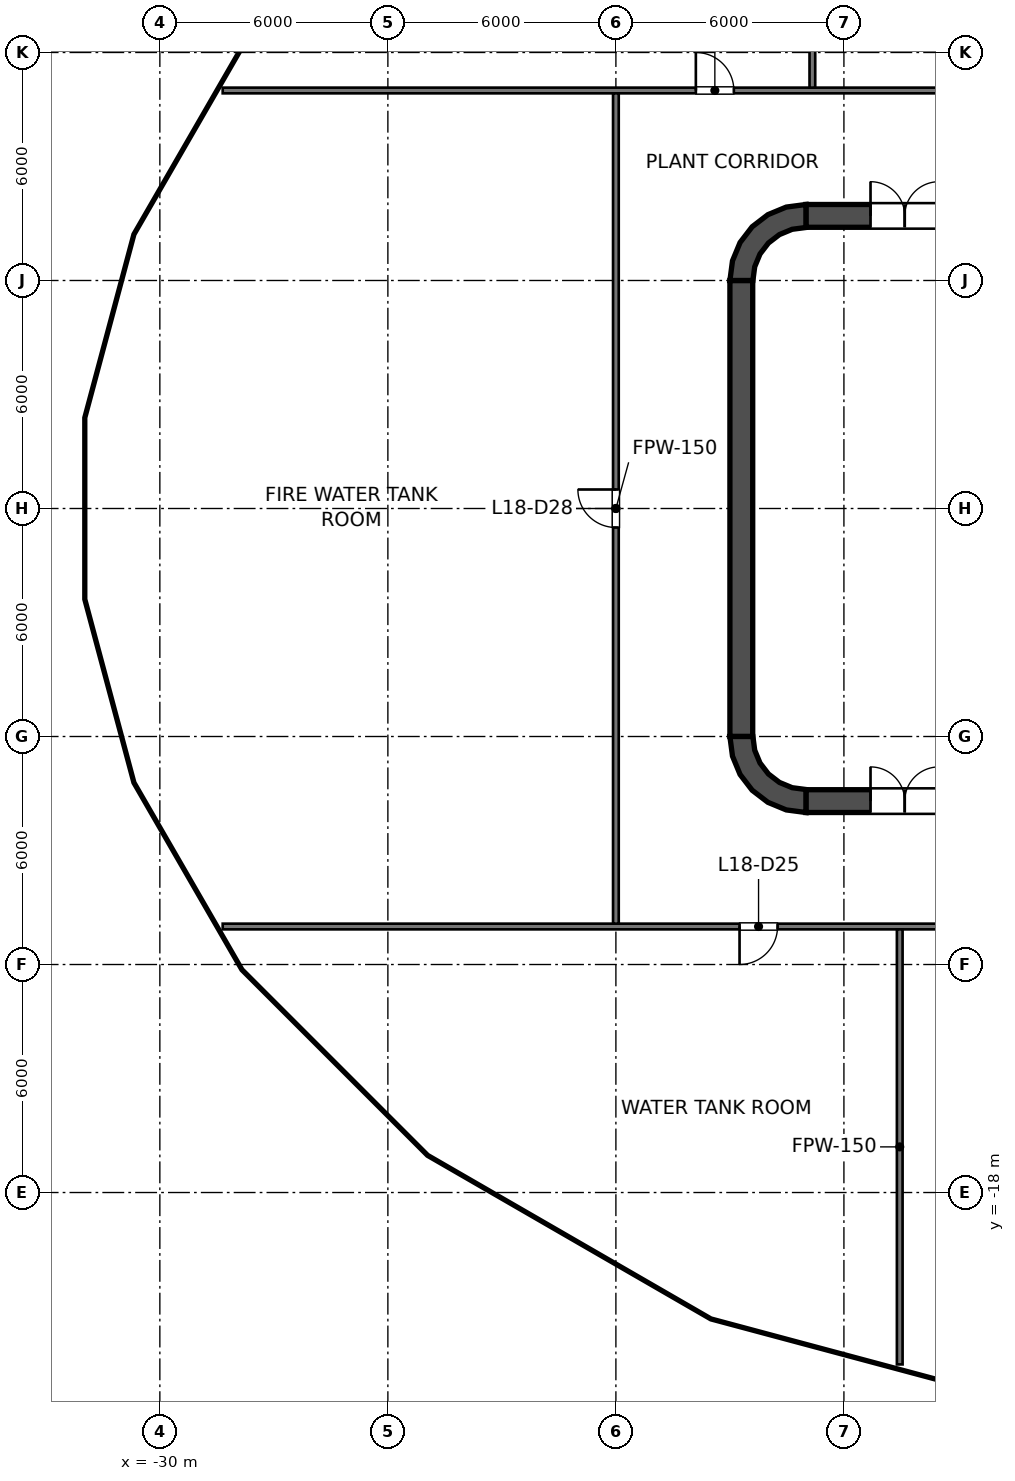
"""IFC4 building model, lengths in metres.
Left out: names, types, materials, properties, quantities, classifications, styles, units other than length and angle.
Written with IfcOpenShell. Run it as: python <this file> out.ifc"""

import sys

from ifc_helpers import new_model, si_unit, direction, frame, frame_2d, origin, place, context, subcontext, project, spatial, polyline, rectangle, outline, extrude, element, fill, save


model = new_model("IFC4")
c1 = context("Model", 3, precision=1e-05, world=origin(), true_north=direction((0.0, 1.0)))
c2 = subcontext(c1, "Body", "Model", "MODEL_VIEW")
j1 = project(units=[si_unit("LENGTHUNIT", "METRE"), si_unit("PLANEANGLEUNIT", "RADIAN")], contexts=[c1])
p1 = place(None, origin())
s1 = spatial("IfcSite", under=j1, at=p1, CompositionType="ELEMENT")
p2 = place(p1, origin())
s2 = spatial("IfcBuilding", under=s1, at=p2, CompositionType="ELEMENT")
p3 = place(p2, frame((0.0, 0.0, 96.6)))
s3 = spatial("IfcBuildingStorey", under=s2, at=p3, CompositionType="ELEMENT", Elevation=96.6)
p4 = place(p3, frame((-13.0, 7.7, 0.0), z_axis=(0.0, 0.0, 1.0), x_axis=(1.0, 0.0, 0.0)))
e1 = element("IfcWall", 1, at=p4, inside=s3, PredefinedType="SHEAR", context=c2, shape_type="SweptSolid", body=[
    extrude(rectangle(XDim=26.0, YDim=0.6, at=frame_2d((13.0, 0.0))), origin(), (0.0, 0.0, 1.0), 5.4),
])
p5 = place(p4, frame((1.7, 0.0, 0.0)))
e2 = element("IfcOpeningElement", 2, at=p5, cuts=e1, PredefinedType="OPENING", context=c2, shape_type="SweptSolid", body=[
    extrude(rectangle(XDim=1.8, YDim=2.1, at=frame_2d((0.9, 1.05))), frame((0.0, 0.3, 0.0), z_axis=(0.0, -1.0, 0.0), x_axis=(1.0, 0.0, 0.0)), (0.0, 0.0, 1.0), 0.6),
])
p6 = place(p4, frame((22.5, 0.0, 0.0)))
e3 = element("IfcOpeningElement", 3, at=p6, cuts=e1, PredefinedType="OPENING", context=c2, shape_type="SweptSolid", body=[
    extrude(rectangle(XDim=1.8, YDim=2.1, at=frame_2d((0.9, 1.05))), frame((0.0, 0.3, 0.0), z_axis=(0.0, -1.0, 0.0), x_axis=(1.0, 0.0, 0.0)), (0.0, 0.0, 1.0), 0.6),
])
p7 = place(p3, frame((-13.0, -7.7, 0.0), z_axis=(0.0, 0.0, 1.0), x_axis=(1.0, 0.0, 0.0)))
e4 = element("IfcWall", 4, at=p7, inside=s3, PredefinedType="SHEAR", context=c2, shape_type="SweptSolid", body=[
    extrude(rectangle(XDim=26.0, YDim=0.6, at=frame_2d((13.0, 0.0))), origin(), (0.0, 0.0, 1.0), 5.4),
])
p8 = place(p7, frame((1.7, 0.0, 0.0)))
e5 = element("IfcOpeningElement", 5, at=p8, cuts=e4, PredefinedType="OPENING", context=c2, shape_type="SweptSolid", body=[
    extrude(rectangle(XDim=1.8, YDim=2.1, at=frame_2d((0.9, 1.05))), frame((0.0, 0.3, 0.0), z_axis=(0.0, -1.0, 0.0), x_axis=(1.0, 0.0, 0.0)), (0.0, 0.0, 1.0), 0.6),
])
p9 = place(p7, frame((22.5, 0.0, 0.0)))
e6 = element("IfcOpeningElement", 6, at=p9, cuts=e4, PredefinedType="OPENING", context=c2, shape_type="SweptSolid", body=[
    extrude(rectangle(XDim=1.8, YDim=2.1, at=frame_2d((0.9, 1.05))), frame((0.0, 0.3, 0.0), z_axis=(0.0, -1.0, 0.0), x_axis=(1.0, 0.0, 0.0)), (0.0, 0.0, 1.0), 0.6),
])
p10 = place(p3, frame((-14.7, -6.0, 0.0), z_axis=(0.0, 0.0, 1.0), x_axis=(0.0, 1.0, 0.0)))
e7 = element("IfcWall", 7, at=p10, inside=s3, PredefinedType="SHEAR", context=c2, shape_type="SweptSolid", body=[
    extrude(rectangle(XDim=12.0, YDim=0.6, at=frame_2d((6.0, 0.0))), origin(), (0.0, 0.0, 1.0), 5.4),
])
p11 = place(p3, origin())
e8 = element("IfcWall", 8, at=p11, inside=s3, PredefinedType="SHEAR", context=c2, shape_type="SweptSolid", body=[
    extrude(outline(polyline([(-15.0, 6.0), (-14.395, 6.0), (-14.347, 6.361), (-14.208, 6.698), (-13.986, 6.986), (-13.698, 7.208), (-13.361, 7.347), (-13.0, 7.395), (-13.0, 8.0), (-13.518, 7.932), (-14.0, 7.732), (-14.414, 7.414), (-14.732, 7.0), (-14.932, 6.518), (-15.0, 6.0)])), origin(), (0.0, 0.0, 1.0), 5.4),
])
e9 = element("IfcWall", 9, at=p11, inside=s3, PredefinedType="SHEAR", context=c2, shape_type="SweptSolid", body=[
    extrude(outline(polyline([(-13.0, -8.0), (-13.0, -7.395), (-13.361, -7.347), (-13.698, -7.208), (-13.986, -6.986), (-14.208, -6.698), (-14.347, -6.361), (-14.395, -6.0), (-15.0, -6.0), (-14.932, -6.518), (-14.732, -7.0), (-14.414, -7.414), (-14.0, -7.732), (-13.518, -7.932), (-13.0, -8.0)])), origin(), (0.0, 0.0, 1.0), 5.4),
])
p12 = place(p3, frame((-11.8, -7.4, 0.0), z_axis=(0.0, 0.0, 1.0), x_axis=(0.0, 1.0, 0.0)))
e10 = element("IfcWall", 10, at=p12, inside=s3, PredefinedType="SOLIDWALL", context=c2, shape_type="SweptSolid", body=[
    extrude(rectangle(XDim=14.8, YDim=0.4, at=frame_2d((7.4, 0.0))), origin(), (0.0, 0.0, 1.0), 5.25),
])
p13 = place(p12, frame((13.552, 0.0, 0.0)))
e11 = element("IfcOpeningElement", 11, at=p13, cuts=e10, PredefinedType="OPENING", context=c2, shape_type="SweptSolid", body=[
    extrude(rectangle(XDim=0.9, YDim=2.1, at=frame_2d((0.45, 1.05))), frame((0.0, 0.2, 0.0), z_axis=(0.0, -1.0, 0.0), x_axis=(1.0, 0.0, 0.0)), (0.0, 0.0, 1.0), 0.4),
])
p14 = place(p12, frame((0.347, 0.0, 0.0)))
e12 = element("IfcOpeningElement", 12, at=p14, cuts=e10, PredefinedType="OPENING", context=c2, shape_type="SweptSolid", body=[
    extrude(rectangle(XDim=0.9, YDim=2.1, at=frame_2d((0.45, 1.05))), frame((0.0, 0.2, 0.0), z_axis=(0.0, -1.0, 0.0), x_axis=(1.0, 0.0, 0.0)), (0.0, 0.0, 1.0), 0.4),
])
e13 = element("IfcWall", 13, at=p11, inside=s3, PredefinedType="SOLIDWALL", context=c2, shape_type="SweptSolid", body=[
    extrude(outline(polyline([(-12.0, -5.925), (-12.0, -5.675), (-14.15, -5.675), (-14.15, -3.025), (-12.0, -3.025), (-12.0, -2.775), (-14.15, -2.775), (-14.15, -0.125), (-12.0, -0.125), (-12.0, 0.125), (-14.15, 0.125), (-14.15, 2.775), (-12.0, 2.775), (-12.0, 3.025), (-14.15, 3.025), (-14.15, 5.675), (-12.0, 5.675), (-12.0, 5.925), (-14.15, 5.925), (-14.4, 5.925), (-14.4, 5.675), (-14.4, 3.025), (-14.4, 2.775), (-14.4, 0.125), (-14.4, -0.125), (-14.4, -2.775), (-14.4, -3.025), (-14.4, -5.675), (-14.4, -5.925), (-14.15, -5.925), (-12.0, -5.925)])), origin(), (0.0, 0.0, 1.0), 5.25),
])
p15 = place(p3, frame((-28.346, 11.0, 0.0), z_axis=(0.0, 0.0, 1.0), x_axis=(1.0, 0.0, 0.0)))
e14 = element("IfcWall", 14, at=p15, inside=s3, PredefinedType="PARTITIONING", context=c2, shape_type="SweptSolid", body=[
    extrude(rectangle(XDim=56.692, YDim=0.15, at=frame_2d((28.346, 0.0))), origin(), (0.0, 0.0, 1.0), 4.327),
])
p16 = place(p15, frame((12.45, 0.0, 0.0)))
e15 = element("IfcOpeningElement", 15, at=p16, cuts=e14, PredefinedType="OPENING", context=c2, shape_type="SweptSolid", body=[
    extrude(rectangle(XDim=1.0, YDim=2.1, at=frame_2d((0.5, 1.05))), frame((0.0, 0.075, 0.0), z_axis=(0.0, -1.0, 0.0), x_axis=(1.0, 0.0, 0.0)), (0.0, 0.0, 1.0), 0.15),
])
p17 = place(p15, frame((19.45, 0.0, 0.0)))
e16 = element("IfcOpeningElement", 16, at=p17, cuts=e14, PredefinedType="OPENING", context=c2, shape_type="SweptSolid", body=[
    extrude(rectangle(XDim=1.0, YDim=2.1, at=frame_2d((0.5, 1.05))), frame((0.0, 0.075, 0.0), z_axis=(0.0, -1.0, 0.0), x_axis=(1.0, 0.0, 0.0)), (0.0, 0.0, 1.0), 0.15),
])
p18 = place(p15, frame((34.65, 0.0, 0.0)))
e17 = element("IfcOpeningElement", 17, at=p18, cuts=e14, PredefinedType="OPENING", context=c2, shape_type="SweptSolid", body=[
    extrude(rectangle(XDim=1.0, YDim=2.1, at=frame_2d((0.5, 1.05))), frame((0.0, 0.075, 0.0), z_axis=(0.0, -1.0, 0.0), x_axis=(1.0, 0.0, 0.0)), (0.0, 0.0, 1.0), 0.15),
])
p19 = place(p15, frame((42.6, 0.0, 0.0)))
e18 = element("IfcOpeningElement", 18, at=p19, cuts=e14, PredefinedType="OPENING", context=c2, shape_type="SweptSolid", body=[
    extrude(rectangle(XDim=1.0, YDim=2.1, at=frame_2d((0.5, 1.05))), frame((0.0, 0.075, 0.0), z_axis=(0.0, -1.0, 0.0), x_axis=(1.0, 0.0, 0.0)), (0.0, 0.0, 1.0), 0.15),
])
p20 = place(p15, frame((26.45, 0.0, 0.0)))
e19 = element("IfcOpeningElement", 19, at=p20, cuts=e14, PredefinedType="OPENING", context=c2, shape_type="SweptSolid", body=[
    extrude(rectangle(XDim=1.8, YDim=2.1, at=frame_2d((0.9, 1.05))), frame((0.0, 0.075, 0.0), z_axis=(0.0, -1.0, 0.0), x_axis=(1.0, 0.0, 0.0)), (0.0, 0.0, 1.0), 0.15),
])
p21 = place(p3, frame((-28.346, -11.0, 0.0), z_axis=(0.0, 0.0, 1.0), x_axis=(1.0, 0.0, 0.0)))
e20 = element("IfcWall", 20, at=p21, inside=s3, PredefinedType="PARTITIONING", context=c2, shape_type="SweptSolid", body=[
    extrude(rectangle(XDim=56.692, YDim=0.15, at=frame_2d((28.346, 0.0))), origin(), (0.0, 0.0, 1.0), 4.327),
])
p22 = place(p21, frame((13.6, 0.0, 0.0)))
e21 = element("IfcOpeningElement", 21, at=p22, cuts=e20, PredefinedType="OPENING", context=c2, shape_type="SweptSolid", body=[
    extrude(rectangle(XDim=1.0, YDim=2.1, at=frame_2d((0.5, 1.05))), frame((0.0, 0.075, 0.0), z_axis=(0.0, -1.0, 0.0), x_axis=(1.0, 0.0, 0.0)), (0.0, 0.0, 1.0), 0.15),
])
p23 = place(p21, frame((21.55, 0.0, 0.0)))
e22 = element("IfcOpeningElement", 22, at=p23, cuts=e20, PredefinedType="OPENING", context=c2, shape_type="SweptSolid", body=[
    extrude(rectangle(XDim=1.0, YDim=2.1, at=frame_2d((0.5, 1.05))), frame((0.0, 0.075, 0.0), z_axis=(0.0, -1.0, 0.0), x_axis=(1.0, 0.0, 0.0)), (0.0, 0.0, 1.0), 0.15),
])
p24 = place(p21, frame((37.85, 0.0, 0.0)))
e23 = element("IfcOpeningElement", 23, at=p24, cuts=e20, PredefinedType="OPENING", context=c2, shape_type="SweptSolid", body=[
    extrude(rectangle(XDim=1.8, YDim=2.1, at=frame_2d((0.9, 1.05))), frame((0.0, 0.075, 0.0), z_axis=(0.0, -1.0, 0.0), x_axis=(1.0, 0.0, 0.0)), (0.0, 0.0, 1.0), 0.15),
])
p25 = place(p21, frame((43.15, 0.0, 0.0)))
e24 = element("IfcOpeningElement", 24, at=p25, cuts=e20, PredefinedType="OPENING", context=c2, shape_type="SweptSolid", body=[
    extrude(rectangle(XDim=1.8, YDim=2.1, at=frame_2d((0.9, 1.05))), frame((0.0, 0.075, 0.0), z_axis=(0.0, -1.0, 0.0), x_axis=(1.0, 0.0, 0.0)), (0.0, 0.0, 1.0), 0.15),
])
p26 = place(p21, frame((28.45, 0.0, 0.0)))
e25 = element("IfcOpeningElement", 25, at=p26, cuts=e20, PredefinedType="OPENING", context=c2, shape_type="SweptSolid", body=[
    extrude(rectangle(XDim=1.8, YDim=2.1, at=frame_2d((0.9, 1.05))), frame((0.0, 0.075, 0.0), z_axis=(0.0, -1.0, 0.0), x_axis=(1.0, 0.0, 0.0)), (0.0, 0.0, 1.0), 0.15),
])
p27 = place(p3, frame((-18.0, -10.925, 0.0), z_axis=(0.0, 0.0, 1.0), x_axis=(0.0, 1.0, 0.0)))
e26 = element("IfcWall", 26, at=p27, inside=s3, PredefinedType="PARTITIONING", context=c2, shape_type="SweptSolid", body=[
    extrude(rectangle(XDim=21.85, YDim=0.15, at=frame_2d((10.925, 0.0))), origin(), (0.0, 0.0, 1.0), 4.327),
])
p28 = place(p27, frame((10.425, 0.0, 0.0)))
e27 = element("IfcOpeningElement", 27, at=p28, cuts=e26, PredefinedType="OPENING", context=c2, shape_type="SweptSolid", body=[
    extrude(rectangle(XDim=1.0, YDim=2.1, at=frame_2d((0.5, 1.05))), frame((0.0, 0.075, 0.0), z_axis=(0.0, -1.0, 0.0), x_axis=(1.0, 0.0, 0.0)), (0.0, 0.0, 1.0), 0.15),
])
p29 = place(p3, frame((-12.83, 11.075, 0.0), z_axis=(0.0, 0.0, 1.0), x_axis=(0.0, 1.0, 0.0)))
e28 = element("IfcWall", 28, at=p29, inside=s3, PredefinedType="PARTITIONING", context=c2, shape_type="SweptSolid", body=[
    extrude(rectangle(XDim=10.832, YDim=0.15, at=frame_2d((5.416, 0.0))), origin(), (0.0, 0.0, 1.0), 4.327),
])
p30 = place(p3, frame((-10.531, -11.075, 0.0), z_axis=(0.0, 0.0, 1.0), x_axis=(0.0, -1.0, 0.0)))
e29 = element("IfcWall", 29, at=p30, inside=s3, PredefinedType="PARTITIONING", context=c2, shape_type="SweptSolid", body=[
    extrude(rectangle(XDim=11.448, YDim=0.15, at=frame_2d((5.724, 0.0))), origin(), (0.0, 0.0, 1.0), 4.327),
])
p31 = place(p13, origin())
e30 = element("IfcDoor", 30, at=p31, inside=s3, OperationType="SINGLE_SWING_LEFT", PredefinedType="DOOR", context=c2, shape_type="SweptSolid", body=[
    extrude(rectangle(XDim=0.9, YDim=2.1, at=frame_2d((0.45, 1.05))), frame((0.0, 0.025, 0.0), z_axis=(0.0, -1.0, 0.0), x_axis=(1.0, 0.0, 0.0)), (0.0, 0.0, 1.0), 0.05),
])
fill(e11, e30)
p32 = place(p14, origin())
e31 = element("IfcDoor", 31, at=p32, inside=s3, OperationType="SINGLE_SWING_LEFT", PredefinedType="DOOR", context=c2, shape_type="SweptSolid", body=[
    extrude(rectangle(XDim=0.9, YDim=2.1, at=frame_2d((0.45, 1.05))), frame((0.0, 0.025, 0.0), z_axis=(0.0, -1.0, 0.0), x_axis=(1.0, 0.0, 0.0)), (0.0, 0.0, 1.0), 0.05),
])
fill(e12, e31)
p33 = place(p5, origin())
e32 = element("IfcDoor", 32, at=p33, inside=s3, OperationType="DOUBLE_DOOR_SINGLE_SWING", PredefinedType="DOOR", context=c2, shape_type="SweptSolid", body=[
    extrude(rectangle(XDim=1.8, YDim=2.1, at=frame_2d((0.9, 1.05))), frame((0.0, 0.025, 0.0), z_axis=(0.0, -1.0, 0.0), x_axis=(1.0, 0.0, 0.0)), (0.0, 0.0, 1.0), 0.05),
])
fill(e2, e32)
p34 = place(p8, origin())
e33 = element("IfcDoor", 33, at=p34, inside=s3, OperationType="DOUBLE_DOOR_SINGLE_SWING", PredefinedType="DOOR", context=c2, shape_type="SweptSolid", body=[
    extrude(rectangle(XDim=1.8, YDim=2.1, at=frame_2d((0.9, 1.05))), frame((0.0, 0.025, 0.0), z_axis=(0.0, -1.0, 0.0), x_axis=(1.0, 0.0, 0.0)), (0.0, 0.0, 1.0), 0.05),
])
fill(e5, e33)
p35 = place(p16, origin())
e34 = element("IfcDoor", 34, at=p35, inside=s3, OperationType="SINGLE_SWING_LEFT", PredefinedType="DOOR", context=c2, shape_type="SweptSolid", body=[
    extrude(rectangle(XDim=1.0, YDim=2.1, at=frame_2d((0.5, 1.05))), frame((0.0, 0.025, 0.0), z_axis=(0.0, -1.0, 0.0), x_axis=(1.0, 0.0, 0.0)), (0.0, 0.0, 1.0), 0.05),
])
fill(e15, e34)
p36 = place(p22, origin())
e35 = element("IfcDoor", 35, at=p36, inside=s3, OperationType="SINGLE_SWING_LEFT", PredefinedType="DOOR", context=c2, shape_type="SweptSolid", body=[
    extrude(rectangle(XDim=1.0, YDim=2.1, at=frame_2d((0.5, 1.05))), frame((0.0, 0.025, 0.0), z_axis=(0.0, -1.0, 0.0), x_axis=(1.0, 0.0, 0.0)), (0.0, 0.0, 1.0), 0.05),
])
fill(e21, e35)
p37 = place(p28, origin())
e36 = element("IfcDoor", 36, at=p37, inside=s3, OperationType="SINGLE_SWING_RIGHT", PredefinedType="DOOR", context=c2, shape_type="SweptSolid", body=[
    extrude(rectangle(XDim=1.0, YDim=2.1, at=frame_2d((0.5, 1.05))), frame((0.0, 0.025, 0.0), z_axis=(0.0, -1.0, 0.0), x_axis=(1.0, 0.0, 0.0)), (0.0, 0.0, 1.0), 0.05),
])
fill(e27, e36)
save(model, sys.argv[1])
